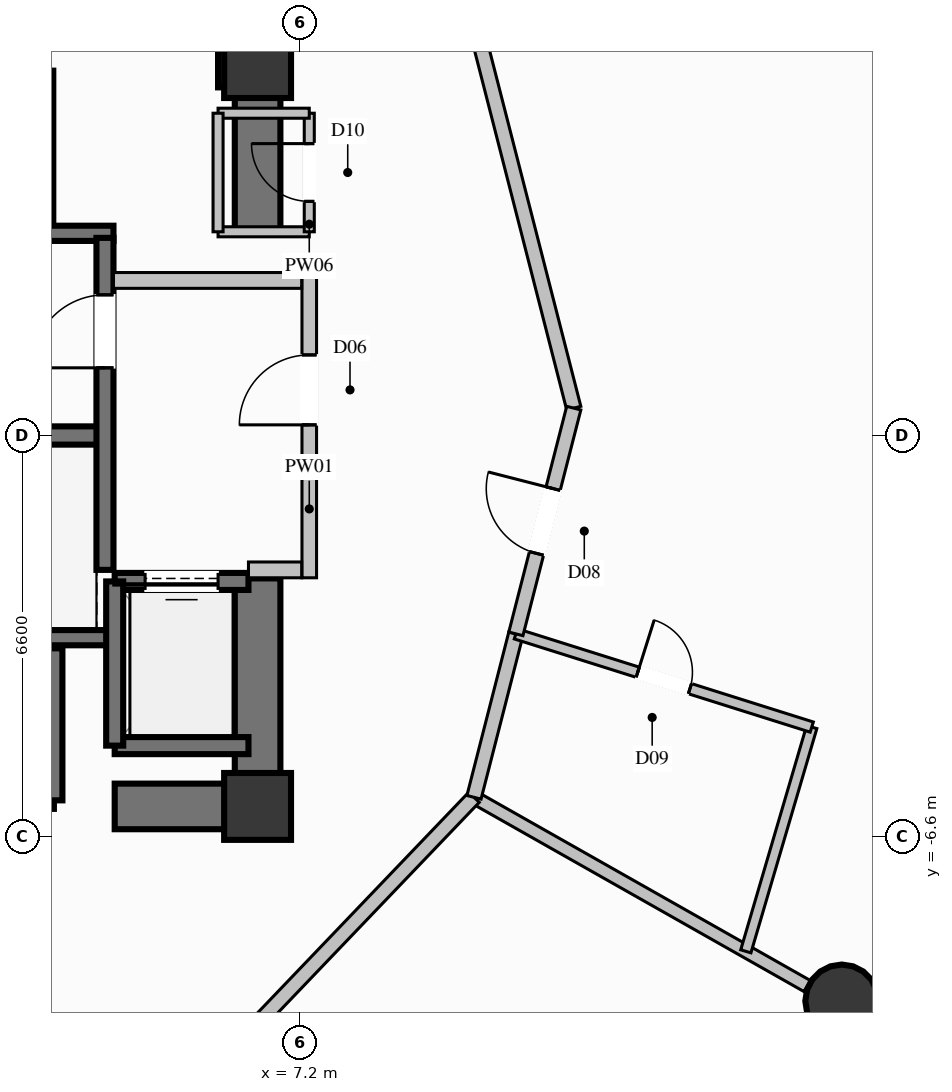
"""IFC4 building model, lengths in metres.
Left out: names, types, materials, properties, quantities, classifications, styles, units other than length and angle.
Written with IfcOpenShell. Run it as: python <this file> out.ifc"""

import sys

from ifc_helpers import new_model, si_unit, direction, frame, frame_2d, origin, origin_2d, place, context, subcontext, project, spatial, rectangle, circle, extrude, element, fill, save


model = new_model("IFC4")
c1 = context("Model", 3, precision=1e-05, world=origin(), true_north=direction((0.0, 1.0)))
c2 = subcontext(c1, "Body", "Model", "MODEL_VIEW")
j1 = project(units=[si_unit("LENGTHUNIT", "METRE"), si_unit("PLANEANGLEUNIT", "RADIAN")], contexts=[c1])
p1 = place(None, origin())
s1 = spatial("IfcSite", under=j1, at=p1, CompositionType="ELEMENT")
p2 = place(p1, origin())
s2 = spatial("IfcBuilding", under=s1, at=p2, CompositionType="ELEMENT")
p3 = place(p2, frame((0.0, 0.0, 46.4)))
s3 = spatial("IfcBuildingStorey", under=s2, at=p3, CompositionType="ELEMENT", Elevation=46.4)
for number, where, z_axis, x_axis in (
    (1, (6.5, -6.1, 0.0), (0.0, 0.0, 1.0), (1.0, 0.0, 0.0)),
    (2, (6.5, 6.1, 0.0), (0.0, 0.0, 1.0), (1.0, 0.0, 0.0)),
):
    element("IfcColumn", number, at=place(p3, frame(where, z_axis=z_axis, x_axis=x_axis)), inside=s3, PredefinedType="COLUMN", context=c2, shape_type="SweptSolid", body=[
        extrude(rectangle(XDim=1.1, YDim=1.1, at=origin_2d()), origin(), (0.0, 0.0, 1.0), 3.6),
    ])
p4 = place(p3, frame((-3.99, 0.0, 0.0), z_axis=(0.0, 0.0, 1.0), x_axis=(1.0, 0.0, 0.0)))
e3 = element("IfcWall", 3, at=p4, inside=s3, PredefinedType="SHEAR", context=c2, shape_type="SweptSolid", body=[
    extrude(rectangle(XDim=7.98, YDim=0.3, at=frame_2d((3.99, 0.0))), origin(), (0.0, 0.0, 1.0), 3.6),
])
for number, where, z_axis, x_axis in (
    (4, (-4.13, -3.325, 0.0), (0.0, 0.0, 1.0), (1.0, 0.0, 0.0)),
    (5, (-4.13, 3.325, 0.0), (0.0, 0.0, 1.0), (1.0, 0.0, 0.0)),
):
    element("IfcWall", number, at=place(p3, frame(where, z_axis=z_axis, x_axis=x_axis)), inside=s3, PredefinedType="SOLIDWALL", context=c2, shape_type="SweptSolid", body=[
        extrude(rectangle(XDim=8.26, YDim=0.25, at=frame_2d((4.13, 0.0))), origin(), (0.0, 0.0, 1.0), 3.6),
    ])
p5 = place(p3, frame((4.15, -6.1, 0.0), z_axis=(0.0, 0.0, 1.0), x_axis=(1.0, 0.0, 0.0)))
e6 = element("IfcWall", 6, at=p5, inside=s3, PredefinedType="SHEAR", context=c2, shape_type="SweptSolid", body=[
    extrude(rectangle(XDim=1.975, YDim=0.75, at=frame_2d((0.988, 0.0))), origin(), (0.0, 0.0, 1.0), 3.6),
])
p6 = place(p3, frame((5.85, 6.1, 0.0), z_axis=(0.0, 0.0, 1.0), x_axis=(1.0, 0.0, 0.0)))
e7 = element("IfcWall", 7, at=p6, inside=s3, PredefinedType="SHEAR", context=c2, shape_type="SweptSolid", body=[
    extrude(rectangle(XDim=0.275, YDim=0.75, at=frame_2d((0.137, 0.0))), origin(), (0.0, 0.0, 1.0), 3.6),
])
p7 = place(p3, frame((6.5, -6.475, 0.0), z_axis=(0.0, 0.0, 1.0), x_axis=(0.0, 1.0, 0.0)))
e8 = element("IfcWall", 8, at=p7, inside=s3, PredefinedType="SHEAR", context=c2, shape_type="SweptSolid", body=[
    extrude(rectangle(XDim=4.125, YDim=0.75, at=frame_2d((2.062, 0.0))), origin(), (0.0, 0.0, 1.0), 3.6),
])
p8 = place(p3, frame((6.5, 3.35, 0.0), z_axis=(0.0, 0.0, 1.0), x_axis=(0.0, 1.0, 0.0)))
e9 = element("IfcWall", 9, at=p8, inside=s3, PredefinedType="SHEAR", context=c2, shape_type="SweptSolid", body=[
    extrude(rectangle(XDim=3.125, YDim=0.75, at=frame_2d((1.562, 0.0))), origin(), (0.0, 0.0, 1.0), 3.6),
])
p9 = place(p3, frame((16.108, -9.3, 0.0), z_axis=(0.0, 0.0, 1.0), x_axis=(1.0, 0.0, 0.0)))
e10 = element("IfcColumn", 10, at=p9, inside=s3, PredefinedType="COLUMN", context=c2, shape_type="SweptSolid", body=[
    extrude(circle(Radius=0.6, at=origin_2d()), origin(), (0.0, 0.0, 1.0), 3.6),
])
p10 = place(p3, frame((1.05, -6.0, 0.0), z_axis=(0.0, 0.0, 1.0), x_axis=(1.0, 0.0, 0.0)))
e11 = element("IfcWall", 11, at=p10, inside=s3, PredefinedType="SOLIDWALL", context=c2, shape_type="SweptSolid", body=[
    extrude(rectangle(XDim=2.1, YDim=0.28, at=frame_2d((1.05, 0.0))), origin(), (0.0, 0.0, 1.0), 3.34),
])
for number, where, z_axis, x_axis in (
    (12, (3.15, -6.0, 0.0), (0.0, 0.0, 1.0), (0.0, 1.0, 0.0)),
    (13, (3.0, 3.5, 0.0), (0.0, 0.0, 1.0), (0.0, 1.0, 0.0)),
):
    element("IfcWall", number, at=place(p3, frame(where, z_axis=z_axis, x_axis=x_axis)), inside=s3, PredefinedType="SOLIDWALL", context=c2, shape_type="SweptSolid", body=[
        extrude(rectangle(XDim=2.5, YDim=0.28, at=frame_2d((1.25, 0.0))), origin(), (0.0, 0.0, 1.0), 3.34),
    ])
p11 = place(p3, frame((4.15, -5.1, 0.0), z_axis=(0.0, 0.0, 1.0), x_axis=(1.0, 0.0, 0.0)))
e14 = element("IfcWall", 14, at=p11, inside=s3, PredefinedType="SOLIDWALL", context=c2, shape_type="SweptSolid", body=[
    extrude(rectangle(XDim=2.2, YDim=0.28, at=frame_2d((1.1, 0.0))), origin(), (0.0, 0.0, 1.0), 3.34),
])
p12 = place(p3, frame((6.35, -2.4, 0.0), z_axis=(0.0, 0.0, 1.0), x_axis=(-1.0, 0.0, 0.0)))
e15 = element("IfcWall", 15, at=p12, inside=s3, PredefinedType="SOLIDWALL", context=c2, shape_type="SweptSolid", body=[
    extrude(rectangle(XDim=2.2, YDim=0.28, at=frame_2d((1.1, 0.0))), origin(), (0.0, 0.0, 1.0), 3.34),
])
p13 = place(p12, frame((0.5, 0.0, 0.0)))
e16 = element("IfcOpeningElement", 16, at=p13, cuts=e15, PredefinedType="OPENING", context=c2, shape_type="SweptSolid", body=[
    extrude(rectangle(XDim=1.2, YDim=2.2, at=frame_2d((0.6, 1.1))), frame((0.0, 0.15, 0.0), z_axis=(0.0, -1.0, 0.0), x_axis=(1.0, 0.0, 0.0)), (0.0, 0.0, 1.0), 0.3),
])
p14 = place(p3, frame((4.15, -2.4, 0.0), z_axis=(0.0, 0.0, 1.0), x_axis=(0.0, -1.0, 0.0)))
e17 = element("IfcWall", 17, at=p14, inside=s3, PredefinedType="SOLIDWALL", context=c2, shape_type="SweptSolid", body=[
    extrude(rectangle(XDim=2.7, YDim=0.28, at=frame_2d((1.35, 0.0))), origin(), (0.0, 0.0, 1.0), 3.34),
])
p15 = place(p3, frame((3.99, -2.21, 0.0), z_axis=(0.0, 0.0, 1.0), x_axis=(0.0, 1.0, 0.0)))
e18 = element("IfcWall", 18, at=p15, inside=s3, PredefinedType="SOLIDWALL", context=c2, shape_type="SweptSolid", body=[
    extrude(rectangle(XDim=5.46, YDim=0.28, at=frame_2d((2.73, 0.0))), origin(), (0.0, 0.0, 1.0), 3.34),
])
p16 = place(p15, frame((3.323, 0.0, 0.0)))
e19 = element("IfcOpeningElement", 19, at=p16, cuts=e18, PredefinedType="OPENING", context=c2, shape_type="SweptSolid", body=[
    extrude(rectangle(XDim=1.2, YDim=2.2, at=frame_2d((0.6, 1.1))), frame((0.0, 0.15, 0.0), z_axis=(0.0, -1.0, 0.0), x_axis=(1.0, 0.0, 0.0)), (0.0, 0.0, 1.0), 0.3),
])
p17 = place(p3, frame((7.35, -2.34, 0.0), z_axis=(0.0, 0.0, 1.0), x_axis=(0.0, 1.0, 0.0)))
e20 = element("IfcWall", 20, at=p17, inside=s3, PredefinedType="PARTITIONING", context=c2, shape_type="SweptSolid", body=[
    extrude(rectangle(XDim=5.02, YDim=0.24, at=frame_2d((2.51, 0.0))), origin(), (0.0, 0.0, 1.0), 2.425),
])
p18 = place(p17, frame((2.515, 0.0, 0.0)))
e21 = element("IfcOpeningElement", 21, at=p18, cuts=e20, PredefinedType="OPENING", context=c2, shape_type="SweptSolid", body=[
    extrude(rectangle(XDim=1.15, YDim=2.2, at=frame_2d((0.575, 1.1))), frame((0.0, 0.13, 0.0), z_axis=(0.0, -1.0, 0.0), x_axis=(1.0, 0.0, 0.0)), (0.0, 0.0, 1.0), 0.26),
])
p19 = place(p3, frame((6.35, -2.21, 0.0), z_axis=(0.0, 0.0, 1.0), x_axis=(1.0, 0.0, 0.0)))
e22 = element("IfcWall", 22, at=p19, inside=s3, PredefinedType="PARTITIONING", context=c2, shape_type="SweptSolid", body=[
    extrude(rectangle(XDim=0.875, YDim=0.26, at=frame_2d((0.438, 0.0))), origin(), (0.0, 0.0, 1.0), 3.34),
])
p20 = place(p3, frame((4.13, 2.55, 0.0), z_axis=(0.0, 0.0, 1.0), x_axis=(1.0, 0.0, 0.0)))
e23 = element("IfcWall", 23, at=p20, inside=s3, PredefinedType="PARTITIONING", context=c2, shape_type="SweptSolid", body=[
    extrude(rectangle(XDim=3.095, YDim=0.26, at=frame_2d((1.548, 0.0))), origin(), (0.0, 0.0, 1.0), 3.34),
])
p21 = place(p3, frame((5.85, 3.35, 0.0), z_axis=(0.0, 0.0, 1.0), x_axis=(1.0, 0.0, 0.0)))
e24 = element("IfcWall", 24, at=p21, inside=s3, PredefinedType="PARTITIONING", context=c2, shape_type="SweptSolid", body=[
    extrude(rectangle(XDim=1.5, YDim=0.165, at=frame_2d((0.75, 0.0))), origin(), (0.0, 0.0, 1.0), 3.34),
])
p22 = place(p3, frame((7.35, 3.35, 0.0), z_axis=(0.0, 0.0, 1.0), x_axis=(0.0, 1.0, 0.0)))
e25 = element("IfcWall", 25, at=p22, inside=s3, PredefinedType="PARTITIONING", context=c2, shape_type="SweptSolid", body=[
    extrude(rectangle(XDim=1.95, YDim=0.165, at=frame_2d((0.975, 0.0))), origin(), (0.0, 0.0, 1.0), 3.34),
])
p23 = place(p22, frame((0.5, 0.0, 0.0)))
e26 = element("IfcOpeningElement", 26, at=p23, cuts=e25, PredefinedType="OPENING", context=c2, shape_type="SweptSolid", body=[
    extrude(rectangle(XDim=0.95, YDim=2.1, at=frame_2d((0.475, 1.05))), frame((0.0, 0.093, 0.0), z_axis=(0.0, -1.0, 0.0), x_axis=(1.0, 0.0, 0.0)), (0.0, 0.0, 1.0), 0.185),
])
p24 = place(p3, frame((7.35, 5.3, 0.0), z_axis=(0.0, 0.0, 1.0), x_axis=(-1.0, 0.0, 0.0)))
e27 = element("IfcWall", 27, at=p24, inside=s3, PredefinedType="PARTITIONING", context=c2, shape_type="SweptSolid", body=[
    extrude(rectangle(XDim=1.5, YDim=0.165, at=frame_2d((0.75, 0.0))), origin(), (0.0, 0.0, 1.0), 2.425),
])
p25 = place(p3, frame((5.85, 5.3, 0.0), z_axis=(0.0, 0.0, 1.0), x_axis=(0.0, -1.0, 0.0)))
e28 = element("IfcWall", 28, at=p25, inside=s3, PredefinedType="PARTITIONING", context=c2, shape_type="SweptSolid", body=[
    extrude(rectangle(XDim=1.95, YDim=0.165, at=frame_2d((0.975, 0.0))), origin(), (0.0, 0.0, 1.0), 2.425),
])
p26 = place(p3, frame((10.059, -5.95, 0.0), z_axis=(0.0, 0.0, 1.0), x_axis=(0.870111959412, -0.492854114407, 0.0)))
e29 = element("IfcWall", 29, at=p26, inside=s3, PredefinedType="PARTITIONING", context=c2, shape_type="SweptSolid", body=[
    extrude(rectangle(XDim=6.298, YDim=0.21, at=frame_2d((3.149, 0.0))), origin(), (0.0, 0.0, 1.0), 2.709),
])
p27 = place(p3, frame((5.575, -10.635, 0.0), z_axis=(0.0, 0.0, 1.0), x_axis=(0.691445702336, 0.722428432941, 0.0)))
e30 = element("IfcWall", 30, at=p27, inside=s3, PredefinedType="PARTITIONING", context=c2, shape_type="SweptSolid", body=[
    extrude(rectangle(XDim=6.485, YDim=0.24, at=frame_2d((3.243, 0.0))), origin(), (0.0, 0.0, 1.0), 3.34),
])
p28 = place(p3, frame((10.059, -5.95, 0.0), z_axis=(0.0, 0.0, 1.0), x_axis=(0.248286444079, 0.968686658154, 0.0)))
e31 = element("IfcWall", 31, at=p28, inside=s3, PredefinedType="PARTITIONING", context=c2, shape_type="SweptSolid", body=[
    extrude(rectangle(XDim=2.775, YDim=0.24, at=frame_2d((1.387, 0.0))), origin(), (0.0, 0.0, 1.0), 3.34),
])
p29 = place(p3, frame((14.53, -8.483, 0.0), z_axis=(0.0, 0.0, 1.0), x_axis=(0.281994391394, 0.959416053244, 0.0)))
e32 = element("IfcWall", 32, at=p29, inside=s3, PredefinedType="PLUMBINGWALL", context=c2, shape_type="SweptSolid", body=[
    extrude(rectangle(XDim=3.844, YDim=0.175, at=frame_2d((1.922, 0.0))), origin(), (0.0, 0.0, 1.0), 3.34),
])
p30 = place(p3, frame((10.748, -3.262, 0.0), z_axis=(0.0, 0.0, 1.0), x_axis=(0.95378856577, -0.300478571294, 0.0)))
e33 = element("IfcWall", 33, at=p30, inside=s3, PredefinedType="PLUMBINGWALL", context=c2, shape_type="SweptSolid", body=[
    extrude(rectangle(XDim=5.102, YDim=0.175, at=frame_2d((2.551, 0.0))), origin(), (0.0, 0.0, 1.0), 3.34),
])
p31 = place(p30, frame((2.101, 0.0, 0.0)))
e34 = element("IfcOpeningElement", 34, at=p31, cuts=e33, PredefinedType="OPENING", context=c2, shape_type="SweptSolid", body=[
    extrude(rectangle(XDim=0.9, YDim=2.1, at=frame_2d((0.45, 1.05))), frame((0.0, 0.098, 0.0), z_axis=(0.0, -1.0, 0.0), x_axis=(1.0, 0.0, 0.0)), (0.0, 0.0, 1.0), 0.195),
])
p32 = place(p3, frame((11.7, 0.45, 0.0), z_axis=(0.0, 0.0, 1.0), x_axis=(-0.248347790771, 0.968670932164, 0.0)))
e35 = element("IfcWall", 35, at=p32, inside=s3, PredefinedType="PARTITIONING", context=c2, shape_type="SweptSolid", body=[
    extrude(rectangle(XDim=6.607, YDim=0.24, at=frame_2d((3.304, 0.0))), origin(), (0.0, 0.0, 1.0), 3.34),
])
p33 = place(p3, frame((10.748, -3.262, 0.0), z_axis=(0.0, 0.0, 1.0), x_axis=(0.248407539497, 0.968655611826, 0.0)))
e36 = element("IfcWall", 36, at=p33, inside=s3, PredefinedType="PARTITIONING", context=c2, shape_type="SweptSolid", body=[
    extrude(rectangle(XDim=3.832, YDim=0.24, at=frame_2d((1.916, 0.0))), origin(), (0.0, 0.0, 1.0), 3.34),
])
p34 = place(p33, frame((1.366, 0.0, 0.0)))
e37 = element("IfcOpeningElement", 37, at=p34, cuts=e36, PredefinedType="OPENING", context=c2, shape_type="SweptSolid", body=[
    extrude(rectangle(XDim=1.1, YDim=2.3, at=frame_2d((0.55, 1.15))), frame((0.0, 0.13, 0.0), z_axis=(0.0, -1.0, 0.0), x_axis=(1.0, 0.0, 0.0)), (0.0, 0.0, 1.0), 0.26),
])
p35 = place(p13, origin())
e38 = element("IfcDoor", 38, at=p35, inside=s3, OperationType="SLIDING_TO_LEFT", PredefinedType="DOOR", context=c2, shape_type="SweptSolid", body=[
    extrude(rectangle(XDim=1.2, YDim=2.2, at=frame_2d((0.6, 1.1))), frame((0.0, 0.025, 0.0), z_axis=(0.0, -1.0, 0.0), x_axis=(1.0, 0.0, 0.0)), (0.0, 0.0, 1.0), 0.05),
])
fill(e16, e38)
p36 = place(p16, origin())
e39 = element("IfcDoor", 39, at=p36, inside=s3, OperationType="SINGLE_SWING_LEFT", PredefinedType="DOOR", context=c2, shape_type="SweptSolid", body=[
    extrude(rectangle(XDim=1.2, YDim=2.2, at=frame_2d((0.6, 1.1))), frame((0.0, 0.025, 0.0), z_axis=(0.0, -1.0, 0.0), x_axis=(1.0, 0.0, 0.0)), (0.0, 0.0, 1.0), 0.05),
])
fill(e19, e39)
p37 = place(p18, origin())
e40 = element("IfcDoor", 40, at=p37, inside=s3, OperationType="SINGLE_SWING_LEFT", PredefinedType="DOOR", context=c2, shape_type="SweptSolid", body=[
    extrude(rectangle(XDim=1.15, YDim=2.2, at=frame_2d((0.575, 1.1))), frame((0.0, 0.025, 0.0), z_axis=(0.0, -1.0, 0.0), x_axis=(1.0, 0.0, 0.0)), (0.0, 0.0, 1.0), 0.05),
])
fill(e21, e40)
p38 = place(p23, origin())
e41 = element("IfcDoor", 41, at=p38, inside=s3, OperationType="SINGLE_SWING_RIGHT", PredefinedType="DOOR", context=c2, shape_type="SweptSolid", body=[
    extrude(rectangle(XDim=0.95, YDim=2.1, at=frame_2d((0.475, 1.05))), frame((0.0, 0.025, 0.0), z_axis=(0.0, -1.0, 0.0), x_axis=(1.0, 0.0, 0.0)), (0.0, 0.0, 1.0), 0.05),
])
fill(e26, e41)
p39 = place(p31, origin())
e42 = element("IfcDoor", 42, at=p39, inside=s3, OperationType="SINGLE_SWING_LEFT", PredefinedType="DOOR", context=c2, shape_type="SweptSolid", body=[
    extrude(rectangle(XDim=0.9, YDim=2.1, at=frame_2d((0.45, 1.05))), frame((0.0, 0.025, 0.0), z_axis=(0.0, -1.0, 0.0), x_axis=(1.0, 0.0, 0.0)), (0.0, 0.0, 1.0), 0.05),
])
fill(e34, e42)
p40 = place(p34, origin())
e43 = element("IfcDoor", 43, at=p40, inside=s3, OperationType="SINGLE_SWING_RIGHT", PredefinedType="DOOR", context=c2, shape_type="SweptSolid", body=[
    extrude(rectangle(XDim=1.1, YDim=2.3, at=frame_2d((0.55, 1.15))), frame((0.0, 0.025, 0.0), z_axis=(0.0, -1.0, 0.0), x_axis=(1.0, 0.0, 0.0)), (0.0, 0.0, 1.0), 0.05),
])
fill(e37, e43)
save(model, sys.argv[1])
